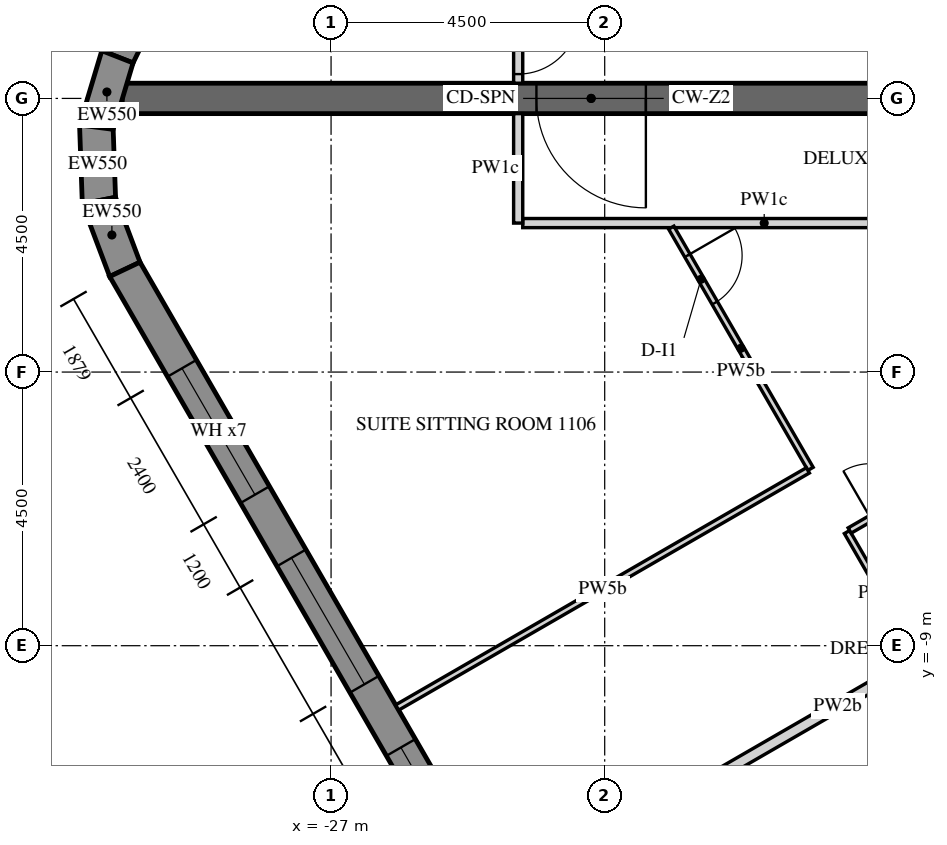
"""IFC4 building model, lengths in metres.
Left out: names, types, materials, properties, quantities, classifications, styles, units other than length and angle.
Written with IfcOpenShell. Run it as: python <this file> out.ifc"""

import sys

from ifc_helpers import new_model, si_unit, direction, frame, frame_2d, origin, place, context, subcontext, project, spatial, polyline, rectangle, outline, extrude, element, fill, save


model = new_model("IFC4")
c1 = context("Model", 3, precision=1e-05, world=origin(), true_north=direction((0.0, 1.0)))
c2 = subcontext(c1, "Body", "Model", "MODEL_VIEW")
j1 = project(units=[si_unit("LENGTHUNIT", "METRE"), si_unit("PLANEANGLEUNIT", "RADIAN")], contexts=[c1])
p1 = place(None, origin())
s1 = spatial("IfcSite", under=j1, at=p1, CompositionType="ELEMENT")
p2 = place(p1, origin())
s2 = spatial("IfcBuilding", under=s1, at=p2, CompositionType="ELEMENT")
p3 = place(p2, frame((0.0, 0.0, 156.6)))
s3 = spatial("IfcBuildingStorey", under=s2, at=p3, CompositionType="ELEMENT", Elevation=156.6)
p4 = place(p3, frame((-18.345, 25.633, -0.15), z_axis=(0.0, 0.0, 1.0), x_axis=(-0.43837181828, -0.898793718791, 0.0)))
e1 = element("IfcWall", 1, at=p4, inside=s3, PredefinedType="SOLIDWALL", context=c2, shape_type="SweptSolid", body=[
    extrude(outline(polyline([(-0.026, -0.275), (27.78, -0.275), (27.735, 0.275), (0.026, 0.275), (-0.026, -0.275)])), origin(), (0.0, 0.0, 1.0), 3.9),
])
p5 = place(p4, frame((1.879, 0.0, 1.05)))
e2 = element("IfcOpeningElement", 2, at=p5, cuts=e1, PredefinedType="OPENING", context=c2, shape_type="SweptSolid", body=[
    extrude(rectangle(XDim=2.4, YDim=2.4, at=frame_2d((1.2, 1.2))), frame((0.0, 0.285, 0.0), z_axis=(0.0, -1.0, 0.0), x_axis=(1.0, 0.0, 0.0)), (0.0, 0.0, 1.0), 0.57),
])
p6 = place(p4, frame((5.479, 0.0, 1.05)))
e3 = element("IfcOpeningElement", 3, at=p6, cuts=e1, PredefinedType="OPENING", context=c2, shape_type="SweptSolid", body=[
    extrude(rectangle(XDim=2.4, YDim=2.4, at=frame_2d((1.2, 1.2))), frame((0.0, 0.285, 0.0), z_axis=(0.0, -1.0, 0.0), x_axis=(1.0, 0.0, 0.0)), (0.0, 0.0, 1.0), 0.57),
])
p7 = place(p4, frame((9.079, 0.0, 1.05)))
e4 = element("IfcOpeningElement", 4, at=p7, cuts=e1, PredefinedType="OPENING", context=c2, shape_type="SweptSolid", body=[
    extrude(rectangle(XDim=2.4, YDim=2.4, at=frame_2d((1.2, 1.2))), frame((0.0, 0.285, 0.0), z_axis=(0.0, -1.0, 0.0), x_axis=(1.0, 0.0, 0.0)), (0.0, 0.0, 1.0), 0.57),
])
p8 = place(p4, frame((12.679, 0.0, 1.05)))
e5 = element("IfcOpeningElement", 5, at=p8, cuts=e1, PredefinedType="OPENING", context=c2, shape_type="SweptSolid", body=[
    extrude(rectangle(XDim=2.4, YDim=2.4, at=frame_2d((1.2, 1.2))), frame((0.0, 0.285, 0.0), z_axis=(0.0, -1.0, 0.0), x_axis=(1.0, 0.0, 0.0)), (0.0, 0.0, 1.0), 0.57),
])
p9 = place(p4, frame((16.279, 0.0, 1.05)))
e6 = element("IfcOpeningElement", 6, at=p9, cuts=e1, PredefinedType="OPENING", context=c2, shape_type="SweptSolid", body=[
    extrude(rectangle(XDim=2.4, YDim=2.4, at=frame_2d((1.2, 1.2))), frame((0.0, 0.285, 0.0), z_axis=(0.0, -1.0, 0.0), x_axis=(1.0, 0.0, 0.0)), (0.0, 0.0, 1.0), 0.57),
])
p10 = place(p4, frame((19.879, 0.0, 1.05)))
e7 = element("IfcOpeningElement", 7, at=p10, cuts=e1, PredefinedType="OPENING", context=c2, shape_type="SweptSolid", body=[
    extrude(rectangle(XDim=2.4, YDim=2.4, at=frame_2d((1.2, 1.2))), frame((0.0, 0.285, 0.0), z_axis=(0.0, -1.0, 0.0), x_axis=(1.0, 0.0, 0.0)), (0.0, 0.0, 1.0), 0.57),
])
p11 = place(p4, frame((23.479, 0.0, 1.05)))
e8 = element("IfcOpeningElement", 8, at=p11, cuts=e1, PredefinedType="OPENING", context=c2, shape_type="SweptSolid", body=[
    extrude(rectangle(XDim=2.4, YDim=2.4, at=frame_2d((1.2, 1.2))), frame((0.0, 0.285, 0.0), z_axis=(0.0, -1.0, 0.0), x_axis=(1.0, 0.0, 0.0)), (0.0, 0.0, 1.0), 0.57),
])
p12 = place(p3, frame((-30.513, 0.684, -0.15), z_axis=(0.0, 0.0, 1.0), x_axis=(-0.286736058109, -0.958009620505, 0.0)))
e9 = element("IfcWall", 9, at=p12, inside=s3, PredefinedType="SOLIDWALL", context=c2, shape_type="SweptSolid", body=[
    extrude(outline(polyline([(-0.022, -0.275), (1.253, -0.275), (1.163, 0.275), (0.022, 0.275), (-0.022, -0.275)])), origin(), (0.0, 0.0, 1.0), 3.9),
])
p13 = place(p3, frame((-30.86, -0.473, -0.15), z_axis=(0.0, 0.0, 1.0), x_axis=(0.03495638276, -0.999388838893, 0.0)))
e10 = element("IfcWall", 10, at=p13, inside=s3, PredefinedType="SOLIDWALL", context=c2, shape_type="SweptSolid", body=[
    extrude(outline(polyline([(-0.045, -0.275), (1.253, -0.275), (1.163, 0.275), (0.045, 0.275), (-0.045, -0.275)])), origin(), (0.0, 0.0, 1.0), 3.9),
])
p14 = place(p3, frame((-30.817, -1.681, -0.15), z_axis=(0.0, 0.0, 1.0), x_axis=(0.352850303963, -0.935679786569, 0.0)))
e11 = element("IfcWall", 11, at=p14, inside=s3, PredefinedType="SOLIDWALL", context=c2, shape_type="SweptSolid", body=[
    extrude(outline(polyline([(-0.045, -0.275), (1.23, -0.275), (1.186, 0.275), (0.045, 0.275), (-0.045, -0.275)])), origin(), (0.0, 0.0, 1.0), 3.9),
])
p15 = place(p3, frame((-30.391, -2.811, -0.15), z_axis=(0.0, 0.0, 1.0), x_axis=(0.499998569178, -0.866026229868, 0.0)))
e12 = element("IfcWall", 12, at=p15, inside=s3, PredefinedType="SOLIDWALL", context=c2, shape_type="SweptSolid", body=[
    extrude(outline(polyline([(-0.022, -0.275), (27.783, -0.275), (27.732, 0.275), (0.022, 0.275), (-0.022, -0.275)])), origin(), (0.0, 0.0, 1.0), 3.9),
])
p16 = place(p15, frame((1.879, 0.0, 1.05)))
e13 = element("IfcOpeningElement", 13, at=p16, cuts=e12, PredefinedType="OPENING", context=c2, shape_type="SweptSolid", body=[
    extrude(rectangle(XDim=2.4, YDim=2.4, at=frame_2d((1.2, 1.2))), frame((0.0, 0.285, 0.0), z_axis=(0.0, -1.0, 0.0), x_axis=(1.0, 0.0, 0.0)), (0.0, 0.0, 1.0), 0.57),
])
p17 = place(p15, frame((5.479, 0.0, 1.05)))
e14 = element("IfcOpeningElement", 14, at=p17, cuts=e12, PredefinedType="OPENING", context=c2, shape_type="SweptSolid", body=[
    extrude(rectangle(XDim=2.4, YDim=2.4, at=frame_2d((1.2, 1.2))), frame((0.0, 0.285, 0.0), z_axis=(0.0, -1.0, 0.0), x_axis=(1.0, 0.0, 0.0)), (0.0, 0.0, 1.0), 0.57),
])
p18 = place(p15, frame((9.079, 0.0, 1.05)))
e15 = element("IfcOpeningElement", 15, at=p18, cuts=e12, PredefinedType="OPENING", context=c2, shape_type="SweptSolid", body=[
    extrude(rectangle(XDim=2.4, YDim=2.4, at=frame_2d((1.2, 1.2))), frame((0.0, 0.285, 0.0), z_axis=(0.0, -1.0, 0.0), x_axis=(1.0, 0.0, 0.0)), (0.0, 0.0, 1.0), 0.57),
])
p19 = place(p15, frame((12.679, 0.0, 1.05)))
e16 = element("IfcOpeningElement", 16, at=p19, cuts=e12, PredefinedType="OPENING", context=c2, shape_type="SweptSolid", body=[
    extrude(rectangle(XDim=2.4, YDim=2.4, at=frame_2d((1.2, 1.2))), frame((0.0, 0.285, 0.0), z_axis=(0.0, -1.0, 0.0), x_axis=(1.0, 0.0, 0.0)), (0.0, 0.0, 1.0), 0.57),
])
p20 = place(p15, frame((16.279, 0.0, 1.05)))
e17 = element("IfcOpeningElement", 17, at=p20, cuts=e12, PredefinedType="OPENING", context=c2, shape_type="SweptSolid", body=[
    extrude(rectangle(XDim=2.4, YDim=2.4, at=frame_2d((1.2, 1.2))), frame((0.0, 0.285, 0.0), z_axis=(0.0, -1.0, 0.0), x_axis=(1.0, 0.0, 0.0)), (0.0, 0.0, 1.0), 0.57),
])
p21 = place(p15, frame((19.879, 0.0, 1.05)))
e18 = element("IfcOpeningElement", 18, at=p21, cuts=e12, PredefinedType="OPENING", context=c2, shape_type="SweptSolid", body=[
    extrude(rectangle(XDim=2.4, YDim=2.4, at=frame_2d((1.2, 1.2))), frame((0.0, 0.285, 0.0), z_axis=(0.0, -1.0, 0.0), x_axis=(1.0, 0.0, 0.0)), (0.0, 0.0, 1.0), 0.57),
])
p22 = place(p15, frame((23.479, 0.0, 1.05)))
e19 = element("IfcOpeningElement", 19, at=p22, cuts=e12, PredefinedType="OPENING", context=c2, shape_type="SweptSolid", body=[
    extrude(rectangle(XDim=2.4, YDim=2.4, at=frame_2d((1.2, 1.2))), frame((0.0, 0.285, 0.0), z_axis=(0.0, -1.0, 0.0), x_axis=(1.0, 0.0, 0.0)), (0.0, 0.0, 1.0), 0.57),
])
p23 = place(p3, frame((-15.011, 0.0, -0.15), z_axis=(0.0, 0.0, 1.0), x_axis=(-1.0, 0.0, 0.0)))
e20 = element("IfcWall", 20, at=p23, inside=s3, PredefinedType="SHEAR", context=c2, shape_type="SweptSolid", body=[
    extrude(rectangle(XDim=15.424, YDim=0.5, at=frame_2d((7.712, 0.0))), origin(), (0.0, 0.0, 1.0), 3.9),
])
p24 = place(p23, frame((6.812, 0.0, 0.15)))
e21 = element("IfcOpeningElement", 21, at=p24, cuts=e20, PredefinedType="OPENING", context=c2, shape_type="SweptSolid", body=[
    extrude(rectangle(XDim=1.8, YDim=2.4, at=frame_2d((0.9, 1.2))), frame((0.0, 0.26, 0.0), z_axis=(0.0, -1.0, 0.0), x_axis=(1.0, 0.0, 0.0)), (0.0, 0.0, 1.0), 0.52),
])
p25 = place(p3, frame((-23.923, 1.975, 0.0), z_axis=(0.0, 0.0, 1.0), x_axis=(0.0, -1.0, 0.0)))
e22 = element("IfcWall", 22, at=p25, inside=s3, PredefinedType="PARTITIONING", context=c2, shape_type="SweptSolid", body=[
    extrude(rectangle(XDim=1.725, YDim=0.15, at=frame_2d((0.863, 0.0))), origin(), (0.0, 0.0, 1.0), 2.823),
])
p26 = place(p25, frame((0.575, 0.0, 0.0)))
e23 = element("IfcOpeningElement", 23, at=p26, cuts=e22, PredefinedType="OPENING", context=c2, shape_type="SweptSolid", body=[
    extrude(rectangle(XDim=1.0, YDim=2.1, at=frame_2d((0.5, 1.05))), frame((0.0, 0.085, 0.0), z_axis=(0.0, -1.0, 0.0), x_axis=(1.0, 0.0, 0.0)), (0.0, 0.0, 1.0), 0.17),
])
p27 = place(p3, frame((-23.848, -2.05, 0.0), z_axis=(0.0, 0.0, 1.0), x_axis=(1.0, 0.0, 0.0)))
e24 = element("IfcWall", 24, at=p27, inside=s3, PredefinedType="PARTITIONING", context=c2, shape_type="SweptSolid", body=[
    extrude(rectangle(XDim=7.942, YDim=0.15, at=frame_2d((3.971, 0.0))), origin(), (0.0, 0.0, 1.0), 2.823),
])
p28 = place(p3, frame((-23.923, -0.25, 0.0), z_axis=(0.0, 0.0, 1.0), x_axis=(0.0, -1.0, 0.0)))
e25 = element("IfcWall", 25, at=p28, inside=s3, PredefinedType="PARTITIONING", context=c2, shape_type="SweptSolid", body=[
    extrude(rectangle(XDim=1.8, YDim=0.15, at=frame_2d((0.9, 0.0))), origin(), (0.0, 0.0, 1.0), 2.823),
])
p29 = place(p3, frame((-17.36, -9.131, 0.0), z_axis=(0.0, 0.0, 1.0), x_axis=(-0.500015210774, 0.866016621662, 0.0)))
e26 = element("IfcWall", 26, at=p29, inside=s3, PredefinedType="PARTITIONING", context=c2, shape_type="SweptSolid", body=[
    extrude(rectangle(XDim=2.31, YDim=0.1, at=frame_2d((1.155, 0.0))), origin(), (0.0, 0.0, 1.0), 2.823),
])
p30 = place(p3, frame((-18.472, -7.106, 0.0), z_axis=(0.0, 0.0, 1.0), x_axis=(0.866087547558, 0.499892348375, 0.0)))
e27 = element("IfcWall", 27, at=p30, inside=s3, PredefinedType="PARTITIONING", context=c2, shape_type="SweptSolid", body=[
    extrude(rectangle(XDim=1.7, YDim=0.1, at=frame_2d((0.85, 0.0))), origin(), (0.0, 0.0, 1.0), 2.823),
])
p31 = place(p30, frame((0.4, 0.0, 0.0)))
e28 = element("IfcOpeningElement", 28, at=p31, cuts=e27, PredefinedType="OPENING", context=c2, shape_type="SweptSolid", body=[
    extrude(rectangle(XDim=0.9, YDim=2.1, at=frame_2d((0.45, 1.05))), frame((0.0, 0.06, 0.0), z_axis=(0.0, -1.0, 0.0), x_axis=(1.0, 0.0, 0.0)), (0.0, 0.0, 1.0), 0.12),
])
p32 = place(p3, frame((-21.405, -2.125, 0.0), z_axis=(0.0, 0.0, 1.0), x_axis=(0.49999161165, -0.866030246746, 0.0)))
e29 = element("IfcWall", 29, at=p32, inside=s3, PredefinedType="PARTITIONING", context=c2, shape_type="SweptSolid", body=[
    extrude(rectangle(XDim=4.58, YDim=0.1, at=frame_2d((2.29, 0.0))), origin(), (0.0, 0.0, 1.0), 2.823),
])
p33 = place(p32, frame((0.53, 0.0, 0.0)))
e30 = element("IfcOpeningElement", 30, at=p33, cuts=e29, PredefinedType="OPENING", context=c2, shape_type="SweptSolid", body=[
    extrude(rectangle(XDim=0.9, YDim=2.1, at=frame_2d((0.45, 1.05))), frame((0.0, 0.06, 0.0), z_axis=(0.0, -1.0, 0.0), x_axis=(1.0, 0.0, 0.0)), (0.0, 0.0, 1.0), 0.12),
])
p34 = place(p3, frame((-19.158, -6.116, 0.0), z_axis=(0.0, 0.0, 1.0), x_axis=(-0.866021400173, -0.500006934395, 0.0)))
e31 = element("IfcWall", 31, at=p34, inside=s3, PredefinedType="PARTITIONING", context=c2, shape_type="SweptSolid", body=[
    extrude(rectangle(XDim=7.8, YDim=0.1, at=frame_2d((3.9, 0.0))), origin(), (0.0, 0.0, 1.0), 2.823),
])
p35 = place(p3, frame((-24.114, -13.134, 0.0), z_axis=(0.0, 0.0, 1.0), x_axis=(0.866024255907, 0.500001988177, 0.0)))
e32 = element("IfcWall", 32, at=p35, inside=s3, PredefinedType="PARTITIONING", context=c2, shape_type="SweptSolid", body=[
    extrude(rectangle(XDim=12.575, YDim=0.18, at=frame_2d((6.288, 0.0))), origin(), (0.0, 0.0, 1.0), 2.823),
])
p36 = place(p16, frame((0.0, 0.205, 0.0)))
e33 = element("IfcWindow", 33, at=p36, inside=s3, PartitioningType="DOUBLE_PANEL_VERTICAL", PredefinedType="WINDOW", context=c2, shape_type="SweptSolid", body=[
    extrude(rectangle(XDim=2.4, YDim=2.4, at=frame_2d((1.2, 1.2))), frame((0.0, 0.03, 0.0), z_axis=(0.0, -1.0, 0.0), x_axis=(1.0, 0.0, 0.0)), (0.0, 0.0, 1.0), 0.06),
])
fill(e13, e33)
p37 = place(p17, frame((0.0, 0.205, 0.0)))
e34 = element("IfcWindow", 34, at=p37, inside=s3, PartitioningType="DOUBLE_PANEL_VERTICAL", PredefinedType="WINDOW", context=c2, shape_type="SweptSolid", body=[
    extrude(rectangle(XDim=2.4, YDim=2.4, at=frame_2d((1.2, 1.2))), frame((0.0, 0.03, 0.0), z_axis=(0.0, -1.0, 0.0), x_axis=(1.0, 0.0, 0.0)), (0.0, 0.0, 1.0), 0.06),
])
fill(e14, e34)
p38 = place(p18, frame((0.0, 0.205, 0.0)))
e35 = element("IfcWindow", 35, at=p38, inside=s3, PartitioningType="DOUBLE_PANEL_VERTICAL", PredefinedType="WINDOW", context=c2, shape_type="SweptSolid", body=[
    extrude(rectangle(XDim=2.4, YDim=2.4, at=frame_2d((1.2, 1.2))), frame((0.0, 0.03, 0.0), z_axis=(0.0, -1.0, 0.0), x_axis=(1.0, 0.0, 0.0)), (0.0, 0.0, 1.0), 0.06),
])
fill(e15, e35)
p39 = place(p24, origin())
e36 = element("IfcDoor", 36, at=p39, inside=s3, OperationType="DOUBLE_DOOR_SINGLE_SWING", PredefinedType="DOOR", context=c2, shape_type="SweptSolid", body=[
    extrude(rectangle(XDim=1.8, YDim=2.4, at=frame_2d((0.9, 1.2))), frame((0.0, 0.025, 0.0), z_axis=(0.0, -1.0, 0.0), x_axis=(1.0, 0.0, 0.0)), (0.0, 0.0, 1.0), 0.05),
])
fill(e21, e36)
p40 = place(p26, origin())
e37 = element("IfcDoor", 37, at=p40, inside=s3, OperationType="SINGLE_SWING_LEFT", PredefinedType="DOOR", context=c2, shape_type="SweptSolid", body=[
    extrude(rectangle(XDim=1.0, YDim=2.1, at=frame_2d((0.5, 1.05))), frame((0.0, 0.025, 0.0), z_axis=(0.0, -1.0, 0.0), x_axis=(1.0, 0.0, 0.0)), (0.0, 0.0, 1.0), 0.05),
])
fill(e23, e37)
p41 = place(p33, origin())
e38 = element("IfcDoor", 38, at=p41, inside=s3, OperationType="SINGLE_SWING_RIGHT", PredefinedType="DOOR", context=c2, shape_type="SweptSolid", body=[
    extrude(rectangle(XDim=0.9, YDim=2.1, at=frame_2d((0.45, 1.05))), frame((0.0, 0.025, 0.0), z_axis=(0.0, -1.0, 0.0), x_axis=(1.0, 0.0, 0.0)), (0.0, 0.0, 1.0), 0.05),
])
fill(e30, e38)
save(model, sys.argv[1])
